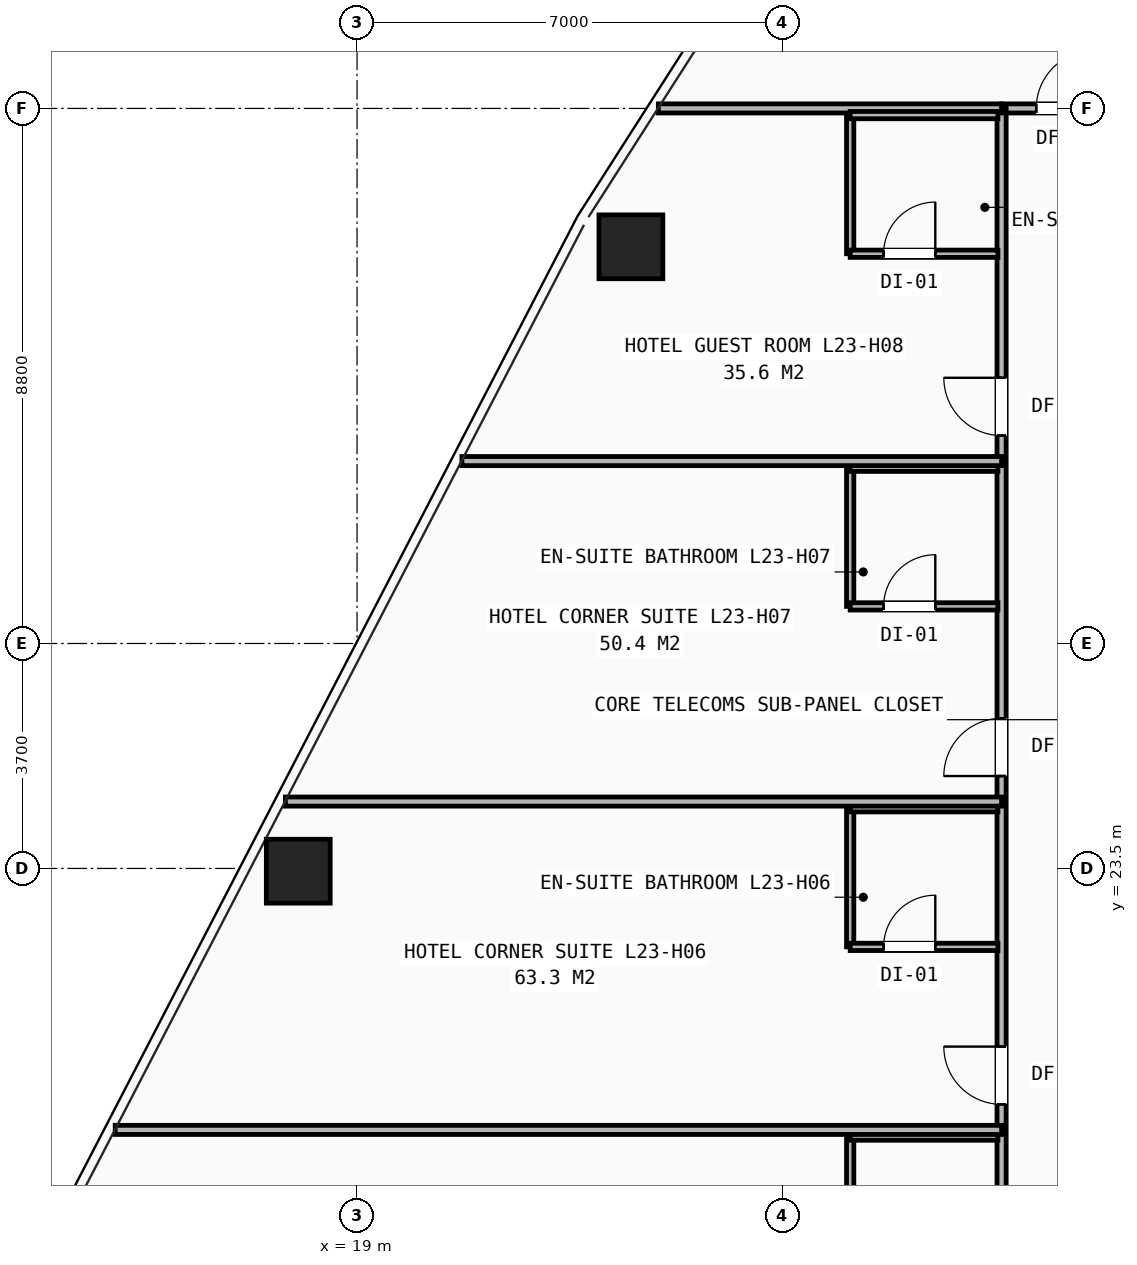
"""IFC4 building model, lengths in metres.
Left out: names, types, materials, properties, quantities, classifications, styles, units other than length and angle.
Written with IfcOpenShell. Run it as: python <this file> out.ifc"""

import sys

from ifc_helpers import new_model, si_unit, direction, frame, frame_2d, origin, origin_2d, place, context, subcontext, project, spatial, rectangle, hollow_rectangle, extrude, element, fill, save


model = new_model("IFC4")
c1 = context("Model", 3, precision=1e-05, world=origin(), true_north=direction((0.0, 1.0)))
c2 = subcontext(c1, "Body", "Model", "MODEL_VIEW")
j1 = project(units=[si_unit("LENGTHUNIT", "METRE"), si_unit("PLANEANGLEUNIT", "RADIAN")], contexts=[c1])
p1 = place(None, origin())
s1 = spatial("IfcSite", under=j1, at=p1, CompositionType="ELEMENT")
p2 = place(p1, origin())
s2 = spatial("IfcBuilding", under=s1, at=p2, CompositionType="ELEMENT")
p3 = place(p2, frame((0.0, 0.0, 83.0)))
s3 = spatial("IfcBuildingStorey", under=s2, at=p3, CompositionType="ELEMENT", Elevation=83.0)
for number, where, z_axis, x_axis in (
    (1, (23.504, 33.724, 0.0), (0.0, 0.0, 1.0), (1.0, 0.0, 0.0)),
    (2, (18.033, 23.455, 0.0), (0.0, 0.0, 1.0), (1.0, 0.0, 0.0)),
):
    element("IfcColumn", number, at=place(p3, frame(where, z_axis=z_axis, x_axis=x_axis)), inside=s3, PredefinedType="COLUMN", context=c2, shape_type="SweptSolid", body=[
        extrude(hollow_rectangle(XDim=1.05, YDim=1.05, WallThickness=0.07, at=origin_2d()), origin(), (0.0, 0.0, 1.0), 3.2),
    ])
p4 = place(p3, frame((29.6, 36.0, 0.0), z_axis=(0.0, 0.0, 1.0), x_axis=(1.0, 0.0, 0.0)))
e3 = element("IfcWall", 3, at=p4, inside=s3, PredefinedType="PARTITIONING", context=c2, shape_type="SweptSolid", body=[
    extrude(rectangle(XDim=9.65, YDim=0.15, at=frame_2d((4.825, 0.0))), origin(), (0.0, 0.0, 1.0), 2.503),
])
p5 = place(p4, frame((0.57, 0.0, 0.0)))
e4 = element("IfcOpeningElement", 4, at=p5, cuts=e3, PredefinedType="OPENING", context=c2, shape_type="SweptSolid", body=[
    extrude(rectangle(XDim=0.95, YDim=2.1, at=frame_2d((0.475, 1.05))), frame((0.0, 0.085, 0.0), z_axis=(0.0, -1.0, 0.0), x_axis=(1.0, 0.0, 0.0)), (0.0, 0.0, 1.0), 0.17),
])
p6 = place(p4, frame((7.62, 0.0, 0.0)))
e5 = element("IfcOpeningElement", 5, at=p6, cuts=e3, PredefinedType="OPENING", context=c2, shape_type="SweptSolid", body=[
    extrude(rectangle(XDim=0.95, YDim=2.1, at=frame_2d((0.475, 1.05))), frame((0.0, 0.085, 0.0), z_axis=(0.0, -1.0, 0.0), x_axis=(1.0, 0.0, 0.0)), (0.0, 0.0, 1.0), 0.17),
])
p7 = place(p3, frame((29.6, 14.1, 0.0), z_axis=(0.0, 0.0, 1.0), x_axis=(0.0, 1.0, 0.0)))
e6 = element("IfcWall", 6, at=p7, inside=s3, PredefinedType="PARTITIONING", context=c2, shape_type="SweptSolid", body=[
    extrude(rectangle(XDim=21.9, YDim=0.15, at=frame_2d((10.95, 0.0))), origin(), (0.0, 0.0, 1.0), 2.421),
])
p8 = place(p7, frame((0.42, 0.0, 0.0)))
e7 = element("IfcOpeningElement", 7, at=p8, cuts=e6, PredefinedType="OPENING", context=c2, shape_type="SweptSolid", body=[
    extrude(rectangle(XDim=0.95, YDim=2.1, at=frame_2d((0.475, 1.05))), frame((0.0, 0.085, 0.0), z_axis=(0.0, -1.0, 0.0), x_axis=(1.0, 0.0, 0.0)), (0.0, 0.0, 1.0), 0.17),
])
p9 = place(p7, frame((5.52, 0.0, 0.0)))
e8 = element("IfcOpeningElement", 8, at=p9, cuts=e6, PredefinedType="OPENING", context=c2, shape_type="SweptSolid", body=[
    extrude(rectangle(XDim=0.95, YDim=2.1, at=frame_2d((0.475, 1.05))), frame((0.0, 0.085, 0.0), z_axis=(0.0, -1.0, 0.0), x_axis=(1.0, 0.0, 0.0)), (0.0, 0.0, 1.0), 0.17),
])
p10 = place(p7, frame((10.92, 0.0, 0.0)))
e9 = element("IfcOpeningElement", 9, at=p10, cuts=e6, PredefinedType="OPENING", context=c2, shape_type="SweptSolid", body=[
    extrude(rectangle(XDim=0.95, YDim=2.1, at=frame_2d((0.475, 1.05))), frame((0.0, 0.085, 0.0), z_axis=(0.0, -1.0, 0.0), x_axis=(1.0, 0.0, 0.0)), (0.0, 0.0, 1.0), 0.17),
])
p11 = place(p7, frame((16.52, 0.0, 0.0)))
e10 = element("IfcOpeningElement", 10, at=p11, cuts=e6, PredefinedType="OPENING", context=c2, shape_type="SweptSolid", body=[
    extrude(rectangle(XDim=0.95, YDim=2.1, at=frame_2d((0.475, 1.05))), frame((0.0, 0.085, 0.0), z_axis=(0.0, -1.0, 0.0), x_axis=(1.0, 0.0, 0.0)), (0.0, 0.0, 1.0), 0.17),
])
p12 = place(p3, frame((23.955, 36.0, 0.0), z_axis=(0.0, 0.0, 1.0), x_axis=(1.0, 0.0, 0.0)))
e11 = element("IfcWall", 11, at=p12, inside=s3, PredefinedType="PARTITIONING", context=c2, shape_type="SweptSolid", body=[
    extrude(rectangle(XDim=5.645, YDim=0.15, at=frame_2d((2.823, 0.0))), origin(), (0.0, 0.0, 1.0), 2.258),
])
p13 = place(p3, frame((27.11, 16.81, 0.0), z_axis=(0.0, 0.0, 1.0), x_axis=(0.0, 1.0, 0.0)))
e12 = element("IfcWall", 12, at=p13, inside=s3, PredefinedType="PARTITIONING", context=c2, shape_type="SweptSolid", body=[
    extrude(rectangle(XDim=2.28, YDim=0.12, at=frame_2d((1.14, 0.0))), origin(), (0.0, 0.0, 1.0), 2.97),
])
p14 = place(p3, frame((27.11, 19.09, 0.0), z_axis=(0.0, 0.0, 1.0), x_axis=(1.0, 0.0, 0.0)))
e13 = element("IfcWall", 13, at=p14, inside=s3, PredefinedType="PARTITIONING", context=c2, shape_type="SweptSolid", body=[
    extrude(rectangle(XDim=2.43, YDim=0.12, at=frame_2d((1.215, 0.0))), origin(), (0.0, 0.0, 1.0), 2.97),
])
p15 = place(p3, frame((15.023, 19.2, 0.0), z_axis=(0.0, 0.0, 1.0), x_axis=(1.0, 0.0, 0.0)))
e14 = element("IfcWall", 14, at=p15, inside=s3, PredefinedType="PARTITIONING", context=c2, shape_type="SweptSolid", body=[
    extrude(rectangle(XDim=14.577, YDim=0.15, at=frame_2d((7.289, 0.0))), origin(), (0.0, 0.0, 1.0), 2.258),
])
p16 = place(p3, frame((27.11, 22.21, 0.0), z_axis=(0.0, 0.0, 1.0), x_axis=(0.0, 1.0, 0.0)))
e15 = element("IfcWall", 15, at=p16, inside=s3, PredefinedType="PARTITIONING", context=c2, shape_type="SweptSolid", body=[
    extrude(rectangle(XDim=2.28, YDim=0.12, at=frame_2d((1.14, 0.0))), origin(), (0.0, 0.0, 1.0), 2.97),
])
p17 = place(p3, frame((27.11, 22.21, 0.0), z_axis=(0.0, 0.0, 1.0), x_axis=(1.0, 0.0, 0.0)))
e16 = element("IfcWall", 16, at=p17, inside=s3, PredefinedType="PARTITIONING", context=c2, shape_type="SweptSolid", body=[
    extrude(rectangle(XDim=2.43, YDim=0.12, at=frame_2d((1.215, 0.0))), origin(), (0.0, 0.0, 1.0), 2.97),
])
p18 = place(p17, frame((0.55, 0.0, 0.0)))
e17 = element("IfcOpeningElement", 17, at=p18, cuts=e16, PredefinedType="OPENING", context=c2, shape_type="SweptSolid", body=[
    extrude(rectangle(XDim=0.85, YDim=2.05, at=frame_2d((0.425, 1.025))), frame((0.0, 0.07, 0.0), z_axis=(0.0, -1.0, 0.0), x_axis=(1.0, 0.0, 0.0)), (0.0, 0.0, 1.0), 0.14),
])
p19 = place(p3, frame((27.11, 24.49, 0.0), z_axis=(0.0, 0.0, 1.0), x_axis=(1.0, 0.0, 0.0)))
e18 = element("IfcWall", 18, at=p19, inside=s3, PredefinedType="PARTITIONING", context=c2, shape_type="SweptSolid", body=[
    extrude(rectangle(XDim=2.43, YDim=0.12, at=frame_2d((1.215, 0.0))), origin(), (0.0, 0.0, 1.0), 2.97),
])
p20 = place(p3, frame((17.822, 24.6, 0.0), z_axis=(0.0, 0.0, 1.0), x_axis=(1.0, 0.0, 0.0)))
e19 = element("IfcWall", 19, at=p20, inside=s3, PredefinedType="PARTITIONING", context=c2, shape_type="SweptSolid", body=[
    extrude(rectangle(XDim=11.778, YDim=0.15, at=frame_2d((5.889, 0.0))), origin(), (0.0, 0.0, 1.0), 2.258),
])
p21 = place(p3, frame((27.11, 27.81, 0.0), z_axis=(0.0, 0.0, 1.0), x_axis=(0.0, 1.0, 0.0)))
e20 = element("IfcWall", 20, at=p21, inside=s3, PredefinedType="PARTITIONING", context=c2, shape_type="SweptSolid", body=[
    extrude(rectangle(XDim=2.28, YDim=0.12, at=frame_2d((1.14, 0.0))), origin(), (0.0, 0.0, 1.0), 2.97),
])
p22 = place(p3, frame((27.11, 27.81, 0.0), z_axis=(0.0, 0.0, 1.0), x_axis=(1.0, 0.0, 0.0)))
e21 = element("IfcWall", 21, at=p22, inside=s3, PredefinedType="PARTITIONING", context=c2, shape_type="SweptSolid", body=[
    extrude(rectangle(XDim=2.43, YDim=0.12, at=frame_2d((1.215, 0.0))), origin(), (0.0, 0.0, 1.0), 2.97),
])
p23 = place(p22, frame((0.55, 0.0, 0.0)))
e22 = element("IfcOpeningElement", 22, at=p23, cuts=e21, PredefinedType="OPENING", context=c2, shape_type="SweptSolid", body=[
    extrude(rectangle(XDim=0.85, YDim=2.05, at=frame_2d((0.425, 1.025))), frame((0.0, 0.07, 0.0), z_axis=(0.0, -1.0, 0.0), x_axis=(1.0, 0.0, 0.0)), (0.0, 0.0, 1.0), 0.14),
])
p24 = place(p3, frame((27.11, 30.09, 0.0), z_axis=(0.0, 0.0, 1.0), x_axis=(1.0, 0.0, 0.0)))
e23 = element("IfcWall", 23, at=p24, inside=s3, PredefinedType="PARTITIONING", context=c2, shape_type="SweptSolid", body=[
    extrude(rectangle(XDim=2.43, YDim=0.12, at=frame_2d((1.215, 0.0))), origin(), (0.0, 0.0, 1.0), 2.97),
])
p25 = place(p3, frame((20.724, 30.2, 0.0), z_axis=(0.0, 0.0, 1.0), x_axis=(1.0, 0.0, 0.0)))
e24 = element("IfcWall", 24, at=p25, inside=s3, PredefinedType="PARTITIONING", context=c2, shape_type="SweptSolid", body=[
    extrude(rectangle(XDim=8.876, YDim=0.15, at=frame_2d((4.438, 0.0))), origin(), (0.0, 0.0, 1.0), 2.258),
])
p26 = place(p3, frame((27.11, 33.61, 0.0), z_axis=(0.0, 0.0, 1.0), x_axis=(0.0, 1.0, 0.0)))
e25 = element("IfcWall", 25, at=p26, inside=s3, PredefinedType="PARTITIONING", context=c2, shape_type="SweptSolid", body=[
    extrude(rectangle(XDim=2.28, YDim=0.12, at=frame_2d((1.14, 0.0))), origin(), (0.0, 0.0, 1.0), 2.97),
])
p27 = place(p3, frame((27.11, 33.61, 0.0), z_axis=(0.0, 0.0, 1.0), x_axis=(1.0, 0.0, 0.0)))
e26 = element("IfcWall", 26, at=p27, inside=s3, PredefinedType="PARTITIONING", context=c2, shape_type="SweptSolid", body=[
    extrude(rectangle(XDim=2.43, YDim=0.12, at=frame_2d((1.215, 0.0))), origin(), (0.0, 0.0, 1.0), 2.503),
])
p28 = place(p27, frame((0.55, 0.0, 0.0)))
e27 = element("IfcOpeningElement", 27, at=p28, cuts=e26, PredefinedType="OPENING", context=c2, shape_type="SweptSolid", body=[
    extrude(rectangle(XDim=0.85, YDim=2.05, at=frame_2d((0.425, 1.025))), frame((0.0, 0.07, 0.0), z_axis=(0.0, -1.0, 0.0), x_axis=(1.0, 0.0, 0.0)), (0.0, 0.0, 1.0), 0.14),
])
p29 = place(p3, frame((27.11, 35.89, 0.0), z_axis=(0.0, 0.0, 1.0), x_axis=(1.0, 0.0, 0.0)))
e28 = element("IfcWall", 28, at=p29, inside=s3, PredefinedType="PARTITIONING", context=c2, shape_type="SweptSolid", body=[
    extrude(rectangle(XDim=2.43, YDim=0.12, at=frame_2d((1.215, 0.0))), origin(), (0.0, 0.0, 1.0), 2.503),
])
p30 = place(p9, origin())
e29 = element("IfcDoor", 29, at=p30, inside=s3, OperationType="SINGLE_SWING_RIGHT", PredefinedType="DOOR", context=c2, shape_type="SweptSolid", body=[
    extrude(rectangle(XDim=0.95, YDim=2.1, at=frame_2d((0.475, 1.05))), frame((0.0, 0.025, 0.0), z_axis=(0.0, -1.0, 0.0), x_axis=(1.0, 0.0, 0.0)), (0.0, 0.0, 1.0), 0.05),
])
fill(e8, e29)
p31 = place(p18, origin())
e30 = element("IfcDoor", 30, at=p31, inside=s3, OperationType="SINGLE_SWING_RIGHT", PredefinedType="DOOR", context=c2, shape_type="SweptSolid", body=[
    extrude(rectangle(XDim=0.85, YDim=2.05, at=frame_2d((0.425, 1.025))), frame((0.0, 0.025, 0.0), z_axis=(0.0, -1.0, 0.0), x_axis=(1.0, 0.0, 0.0)), (0.0, 0.0, 1.0), 0.05),
])
fill(e17, e30)
p32 = place(p10, origin())
e31 = element("IfcDoor", 31, at=p32, inside=s3, OperationType="SINGLE_SWING_LEFT", PredefinedType="DOOR", context=c2, shape_type="SweptSolid", body=[
    extrude(rectangle(XDim=0.95, YDim=2.1, at=frame_2d((0.475, 1.05))), frame((0.0, 0.025, 0.0), z_axis=(0.0, -1.0, 0.0), x_axis=(1.0, 0.0, 0.0)), (0.0, 0.0, 1.0), 0.05),
])
fill(e9, e31)
p33 = place(p23, origin())
e32 = element("IfcDoor", 32, at=p33, inside=s3, OperationType="SINGLE_SWING_RIGHT", PredefinedType="DOOR", context=c2, shape_type="SweptSolid", body=[
    extrude(rectangle(XDim=0.85, YDim=2.05, at=frame_2d((0.425, 1.025))), frame((0.0, 0.025, 0.0), z_axis=(0.0, -1.0, 0.0), x_axis=(1.0, 0.0, 0.0)), (0.0, 0.0, 1.0), 0.05),
])
fill(e22, e32)
p34 = place(p11, origin())
e33 = element("IfcDoor", 33, at=p34, inside=s3, OperationType="SINGLE_SWING_RIGHT", PredefinedType="DOOR", context=c2, shape_type="SweptSolid", body=[
    extrude(rectangle(XDim=0.95, YDim=2.1, at=frame_2d((0.475, 1.05))), frame((0.0, 0.025, 0.0), z_axis=(0.0, -1.0, 0.0), x_axis=(1.0, 0.0, 0.0)), (0.0, 0.0, 1.0), 0.05),
])
fill(e10, e33)
p35 = place(p28, origin())
e34 = element("IfcDoor", 34, at=p35, inside=s3, OperationType="SINGLE_SWING_RIGHT", PredefinedType="DOOR", context=c2, shape_type="SweptSolid", body=[
    extrude(rectangle(XDim=0.85, YDim=2.05, at=frame_2d((0.425, 1.025))), frame((0.0, 0.025, 0.0), z_axis=(0.0, -1.0, 0.0), x_axis=(1.0, 0.0, 0.0)), (0.0, 0.0, 1.0), 0.05),
])
fill(e27, e34)
p36 = place(p5, origin())
e35 = element("IfcDoor", 35, at=p36, inside=s3, OperationType="SINGLE_SWING_RIGHT", PredefinedType="DOOR", context=c2, shape_type="SweptSolid", body=[
    extrude(rectangle(XDim=0.95, YDim=2.1, at=frame_2d((0.475, 1.05))), frame((0.0, 0.025, 0.0), z_axis=(0.0, -1.0, 0.0), x_axis=(1.0, 0.0, 0.0)), (0.0, 0.0, 1.0), 0.05),
])
fill(e4, e35)
save(model, sys.argv[1])
